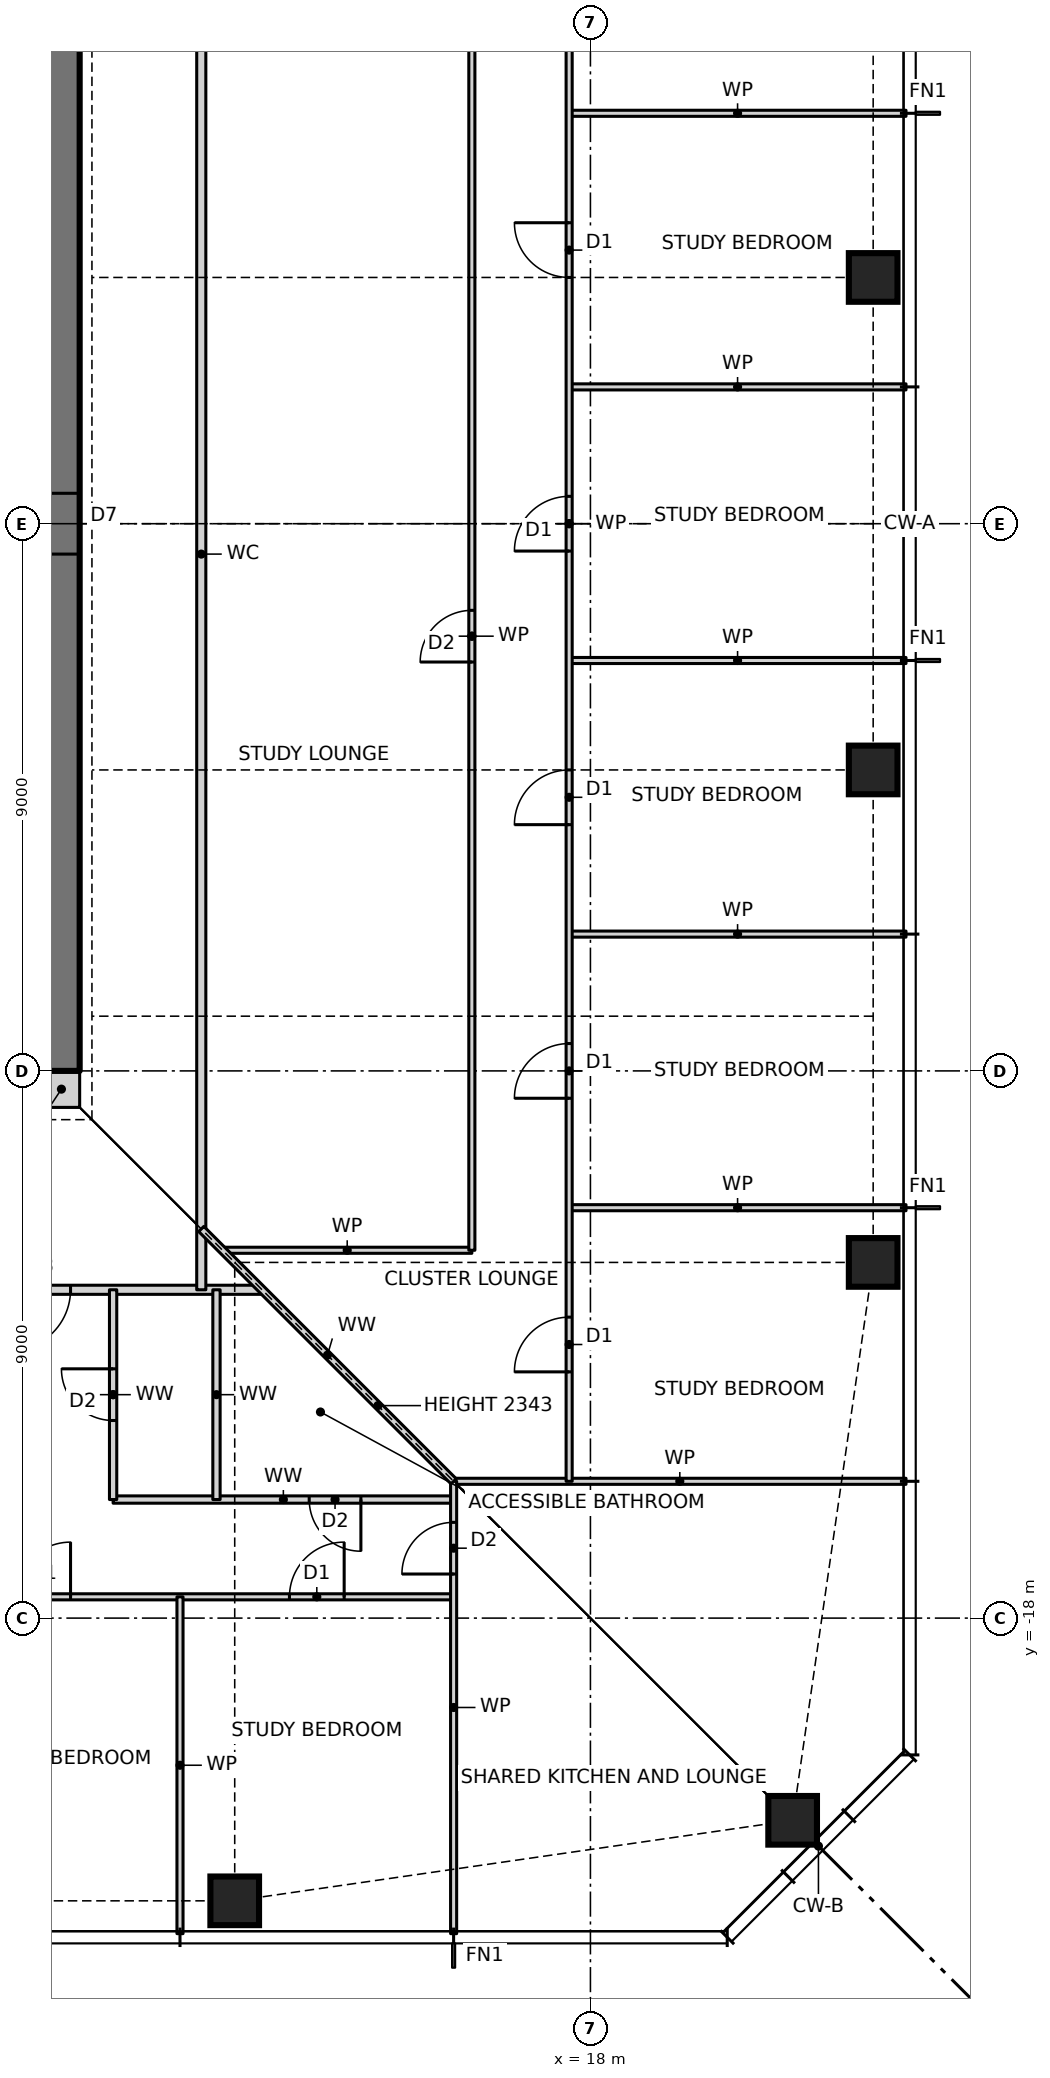
"""IFC4 building model, lengths in metres.
Left out: names, types, materials, properties, quantities, classifications, styles, units other than length and angle.
Written with IfcOpenShell. Run it as: python <this file> out.ifc"""

import sys

from ifc_helpers import new_model, si_unit, direction, frame, frame_2d, origin, origin_2d, place, context, subcontext, project, spatial, rectangle, hollow_rectangle, extrude, element, fill, save


model = new_model("IFC4")
c1 = context("Model", 3, precision=1e-05, world=origin(), true_north=direction((0.0, 1.0)))
c2 = subcontext(c1, "Body", "Model", "MODEL_VIEW")
j1 = project(units=[si_unit("LENGTHUNIT", "METRE"), si_unit("PLANEANGLEUNIT", "RADIAN")], contexts=[c1])
p1 = place(None, origin())
s1 = spatial("IfcSite", under=j1, at=p1, CompositionType="ELEMENT")
p2 = place(p1, origin())
s2 = spatial("IfcBuilding", under=s1, at=p2, CompositionType="ELEMENT")
p3 = place(p2, frame((0.0, 0.0, 15.0)))
s3 = spatial("IfcBuildingStorey", under=s2, at=p3, CompositionType="ELEMENT", Elevation=15.0)
for number, where, z_axis, x_axis in (
    (1, (12.15, -22.65, 0.0), (0.0, 0.0, 1.0), (1.0, 0.0, 0.0)),
    (2, (21.326, -21.326, 0.0), (0.0, 0.0, 1.0), (1.0, 0.0, 0.0)),
    (3, (22.65, -12.15, 0.0), (0.0, 0.0, 1.0), (1.0, 0.0, 0.0)),
    (4, (22.65, -4.05, 0.0), (0.0, 0.0, 1.0), (1.0, 0.0, 0.0)),
    (5, (22.65, 4.05, 0.0), (0.0, 0.0, 1.0), (1.0, 0.0, 0.0)),
):
    element("IfcColumn", number, at=place(p3, frame(where, z_axis=z_axis, x_axis=x_axis)), inside=s3, PredefinedType="COLUMN", context=c2, shape_type="SweptSolid", body=[
        extrude(hollow_rectangle(XDim=0.8, YDim=0.8, WallThickness=0.09, at=origin_2d()), origin(), (0.0, 0.0, 1.0), 3.5),
    ])
p4 = place(p3, frame((9.0, -9.3, 0.0), z_axis=(0.0, 0.0, 1.0), x_axis=(1.0, 0.0, 0.0)))
e6 = element("IfcWall", 6, at=p4, inside=s3, PredefinedType="SOLIDWALL", context=c2, shape_type="SweptSolid", body=[
    extrude(rectangle(XDim=0.6, YDim=0.6, at=frame_2d((0.3, 0.0))), origin(), (0.0, 0.0, 1.0), 3.5),
])
p5 = place(p3, frame((9.0, -9.0, 0.0), z_axis=(0.0, 0.0, 1.0), x_axis=(0.0, 1.0, 0.0)))
e7 = element("IfcWall", 7, at=p5, inside=s3, PredefinedType="SHEAR", context=c2, shape_type="SweptSolid", body=[
    extrude(rectangle(XDim=18.0, YDim=1.2, at=frame_2d((9.0, 0.0))), origin(), (0.0, 0.0, 1.0), 3.5),
])
p6 = place(p5, frame((8.5, 0.0, 0.0)))
e8 = element("IfcOpeningElement", 8, at=p6, cuts=e7, PredefinedType="OPENING", context=c2, shape_type="SweptSolid", body=[
    extrude(rectangle(XDim=1.0, YDim=2.1, at=frame_2d((0.5, 1.05))), frame((0.0, 0.61, 0.0), z_axis=(0.0, -1.0, 0.0), x_axis=(1.0, 0.0, 0.0)), (0.0, 0.0, 1.0), 1.22),
])
p7 = place(p3, frame((-15.75, -17.65, 0.0), z_axis=(0.0, 0.0, 1.0), x_axis=(1.0, 0.0, 0.0)))
e9 = element("IfcWall", 9, at=p7, inside=s3, PredefinedType="PARTITIONING", context=c2, shape_type="SweptSolid", body=[
    extrude(rectangle(XDim=31.5, YDim=0.1, at=frame_2d((15.75, 0.0))), origin(), (0.0, 0.0, 1.0), 3.27),
])
p8 = place(p7, frame((1.8, 0.0, 0.0)))
e10 = element("IfcOpeningElement", 10, at=p8, cuts=e9, PredefinedType="OPENING", context=c2, shape_type="SweptSolid", body=[
    extrude(rectangle(XDim=0.9, YDim=2.1, at=frame_2d((0.45, 1.05))), frame((0.0, 0.06, 0.0), z_axis=(0.0, -1.0, 0.0), x_axis=(1.0, 0.0, 0.0)), (0.0, 0.0, 1.0), 0.12),
])
p9 = place(p7, frame((6.3, 0.0, 0.0)))
e11 = element("IfcOpeningElement", 11, at=p9, cuts=e9, PredefinedType="OPENING", context=c2, shape_type="SweptSolid", body=[
    extrude(rectangle(XDim=0.9, YDim=2.1, at=frame_2d((0.45, 1.05))), frame((0.0, 0.06, 0.0), z_axis=(0.0, -1.0, 0.0), x_axis=(1.0, 0.0, 0.0)), (0.0, 0.0, 1.0), 0.12),
])
p10 = place(p7, frame((10.8, 0.0, 0.0)))
e12 = element("IfcOpeningElement", 12, at=p10, cuts=e9, PredefinedType="OPENING", context=c2, shape_type="SweptSolid", body=[
    extrude(rectangle(XDim=0.9, YDim=2.1, at=frame_2d((0.45, 1.05))), frame((0.0, 0.06, 0.0), z_axis=(0.0, -1.0, 0.0), x_axis=(1.0, 0.0, 0.0)), (0.0, 0.0, 1.0), 0.12),
])
p11 = place(p7, frame((15.3, 0.0, 0.0)))
e13 = element("IfcOpeningElement", 13, at=p11, cuts=e9, PredefinedType="OPENING", context=c2, shape_type="SweptSolid", body=[
    extrude(rectangle(XDim=0.9, YDim=2.1, at=frame_2d((0.45, 1.05))), frame((0.0, 0.06, 0.0), z_axis=(0.0, -1.0, 0.0), x_axis=(1.0, 0.0, 0.0)), (0.0, 0.0, 1.0), 0.12),
])
p12 = place(p7, frame((19.8, 0.0, 0.0)))
e14 = element("IfcOpeningElement", 14, at=p12, cuts=e9, PredefinedType="OPENING", context=c2, shape_type="SweptSolid", body=[
    extrude(rectangle(XDim=0.9, YDim=2.1, at=frame_2d((0.45, 1.05))), frame((0.0, 0.06, 0.0), z_axis=(0.0, -1.0, 0.0), x_axis=(1.0, 0.0, 0.0)), (0.0, 0.0, 1.0), 0.12),
])
p13 = place(p7, frame((24.3, 0.0, 0.0)))
e15 = element("IfcOpeningElement", 15, at=p13, cuts=e9, PredefinedType="OPENING", context=c2, shape_type="SweptSolid", body=[
    extrude(rectangle(XDim=0.9, YDim=2.1, at=frame_2d((0.45, 1.05))), frame((0.0, 0.06, 0.0), z_axis=(0.0, -1.0, 0.0), x_axis=(1.0, 0.0, 0.0)), (0.0, 0.0, 1.0), 0.12),
])
p14 = place(p7, frame((28.8, 0.0, 0.0)))
e16 = element("IfcOpeningElement", 16, at=p14, cuts=e9, PredefinedType="OPENING", context=c2, shape_type="SweptSolid", body=[
    extrude(rectangle(XDim=0.9, YDim=2.1, at=frame_2d((0.45, 1.05))), frame((0.0, 0.06, 0.0), z_axis=(0.0, -1.0, 0.0), x_axis=(1.0, 0.0, 0.0)), (0.0, 0.0, 1.0), 0.12),
])
p15 = place(p3, frame((10.15, -16.05, 0.0), z_axis=(0.0, 0.0, 1.0), x_axis=(1.0, 0.0, 0.0)))
e17 = element("IfcWall", 17, at=p15, inside=s3, PredefinedType="PARTITIONING", context=c2, shape_type="SweptSolid", body=[
    extrude(rectangle(XDim=5.6, YDim=0.12, at=frame_2d((2.8, 0.0))), origin(), (0.0, 0.0, 1.0), 3.27),
])
p16 = place(p15, frame((3.225, 0.0, 0.0)))
e18 = element("IfcOpeningElement", 18, at=p16, cuts=e17, PredefinedType="OPENING", context=c2, shape_type="SweptSolid", body=[
    extrude(rectangle(XDim=0.85, YDim=2.1, at=frame_2d((0.425, 1.05))), frame((0.0, 0.07, 0.0), z_axis=(0.0, -1.0, 0.0), x_axis=(1.0, 0.0, 0.0)), (0.0, 0.0, 1.0), 0.14),
])
p17 = place(p3, frame((15.75, -15.75, 0.0), z_axis=(0.0, 0.0, 1.0), x_axis=(1.0, 0.0, 0.0)))
e19 = element("IfcWall", 19, at=p17, inside=s3, PredefinedType="PARTITIONING", context=c2, shape_type="SweptSolid", body=[
    extrude(rectangle(XDim=7.44, YDim=0.1, at=frame_2d((3.72, 0.0))), origin(), (0.0, 0.0, 1.0), 3.27),
])
p18 = place(p3, frame((-12.6, -12.6, 0.0), z_axis=(0.0, 0.0, 1.0), x_axis=(1.0, 0.0, 0.0)))
e20 = element("IfcWall", 20, at=p18, inside=s3, PredefinedType="PARTITIONING", context=c2, shape_type="SweptSolid", body=[
    extrude(rectangle(XDim=25.2, YDim=0.15, at=frame_2d((12.6, 0.0))), origin(), (0.0, 0.0, 1.0), 3.27),
])
p19 = place(p18, frame((21.05, 0.0, 0.0)))
e21 = element("IfcOpeningElement", 21, at=p19, cuts=e20, PredefinedType="OPENING", context=c2, shape_type="SweptSolid", body=[
    extrude(rectangle(XDim=1.0, YDim=2.1, at=frame_2d((0.5, 1.05))), frame((0.0, 0.085, 0.0), z_axis=(0.0, -1.0, 0.0), x_axis=(1.0, 0.0, 0.0)), (0.0, 0.0, 1.0), 0.17),
])
p20 = place(p3, frame((11.95, -11.95, 0.0), z_axis=(0.0, 0.0, 1.0), x_axis=(1.0, 0.0, 0.0)))
e22 = element("IfcWall", 22, at=p20, inside=s3, PredefinedType="PARTITIONING", context=c2, shape_type="SweptSolid", body=[
    extrude(rectangle(XDim=4.1, YDim=0.1, at=frame_2d((2.05, 0.0))), origin(), (0.0, 0.0, 1.0), 3.27),
])
for number, where, z_axis, x_axis in (
    (23, (17.65, -11.25, 0.0), (0.0, 0.0, 1.0), (1.0, 0.0, 0.0)),
    (24, (17.65, -6.75, 0.0), (0.0, 0.0, 1.0), (1.0, 0.0, 0.0)),
    (25, (17.65, -2.25, 0.0), (0.0, 0.0, 1.0), (1.0, 0.0, 0.0)),
    (26, (17.65, 2.25, 0.0), (0.0, 0.0, 1.0), (1.0, 0.0, 0.0)),
    (27, (17.65, 6.75, 0.0), (0.0, 0.0, 1.0), (1.0, 0.0, 0.0)),
):
    element("IfcWall", number, at=place(p3, frame(where, z_axis=z_axis, x_axis=x_axis)), inside=s3, PredefinedType="PARTITIONING", context=c2, shape_type="SweptSolid", body=[
        extrude(rectangle(XDim=5.54, YDim=0.1, at=frame_2d((2.77, 0.0))), origin(), (0.0, 0.0, 1.0), 3.27),
    ])
p21 = place(p3, frame((17.65, -15.75, 0.0), z_axis=(0.0, 0.0, 1.0), x_axis=(0.0, 1.0, 0.0)))
e28 = element("IfcWall", 28, at=p21, inside=s3, PredefinedType="PARTITIONING", context=c2, shape_type="SweptSolid", body=[
    extrude(rectangle(XDim=31.5, YDim=0.1, at=frame_2d((15.75, 0.0))), origin(), (0.0, 0.0, 1.0), 3.27),
])
p22 = place(p21, frame((1.8, 0.0, 0.0)))
e29 = element("IfcOpeningElement", 29, at=p22, cuts=e28, PredefinedType="OPENING", context=c2, shape_type="SweptSolid", body=[
    extrude(rectangle(XDim=0.9, YDim=2.1, at=frame_2d((0.45, 1.05))), frame((0.0, 0.06, 0.0), z_axis=(0.0, -1.0, 0.0), x_axis=(1.0, 0.0, 0.0)), (0.0, 0.0, 1.0), 0.12),
])
p23 = place(p21, frame((6.3, 0.0, 0.0)))
e30 = element("IfcOpeningElement", 30, at=p23, cuts=e28, PredefinedType="OPENING", context=c2, shape_type="SweptSolid", body=[
    extrude(rectangle(XDim=0.9, YDim=2.1, at=frame_2d((0.45, 1.05))), frame((0.0, 0.06, 0.0), z_axis=(0.0, -1.0, 0.0), x_axis=(1.0, 0.0, 0.0)), (0.0, 0.0, 1.0), 0.12),
])
p24 = place(p21, frame((10.8, 0.0, 0.0)))
e31 = element("IfcOpeningElement", 31, at=p24, cuts=e28, PredefinedType="OPENING", context=c2, shape_type="SweptSolid", body=[
    extrude(rectangle(XDim=0.9, YDim=2.1, at=frame_2d((0.45, 1.05))), frame((0.0, 0.06, 0.0), z_axis=(0.0, -1.0, 0.0), x_axis=(1.0, 0.0, 0.0)), (0.0, 0.0, 1.0), 0.12),
])
p25 = place(p21, frame((15.3, 0.0, 0.0)))
e32 = element("IfcOpeningElement", 32, at=p25, cuts=e28, PredefinedType="OPENING", context=c2, shape_type="SweptSolid", body=[
    extrude(rectangle(XDim=0.9, YDim=2.1, at=frame_2d((0.45, 1.05))), frame((0.0, 0.06, 0.0), z_axis=(0.0, -1.0, 0.0), x_axis=(1.0, 0.0, 0.0)), (0.0, 0.0, 1.0), 0.12),
])
p26 = place(p21, frame((19.8, 0.0, 0.0)))
e33 = element("IfcOpeningElement", 33, at=p26, cuts=e28, PredefinedType="OPENING", context=c2, shape_type="SweptSolid", body=[
    extrude(rectangle(XDim=0.9, YDim=2.1, at=frame_2d((0.45, 1.05))), frame((0.0, 0.06, 0.0), z_axis=(0.0, -1.0, 0.0), x_axis=(1.0, 0.0, 0.0)), (0.0, 0.0, 1.0), 0.12),
])
p27 = place(p21, frame((24.3, 0.0, 0.0)))
e34 = element("IfcOpeningElement", 34, at=p27, cuts=e28, PredefinedType="OPENING", context=c2, shape_type="SweptSolid", body=[
    extrude(rectangle(XDim=0.9, YDim=2.1, at=frame_2d((0.45, 1.05))), frame((0.0, 0.06, 0.0), z_axis=(0.0, -1.0, 0.0), x_axis=(1.0, 0.0, 0.0)), (0.0, 0.0, 1.0), 0.12),
])
p28 = place(p21, frame((28.8, 0.0, 0.0)))
e35 = element("IfcOpeningElement", 35, at=p28, cuts=e28, PredefinedType="OPENING", context=c2, shape_type="SweptSolid", body=[
    extrude(rectangle(XDim=0.9, YDim=2.1, at=frame_2d((0.45, 1.05))), frame((0.0, 0.06, 0.0), z_axis=(0.0, -1.0, 0.0), x_axis=(1.0, 0.0, 0.0)), (0.0, 0.0, 1.0), 0.12),
])
p29 = place(p3, frame((16.05, -11.95, 0.0), z_axis=(0.0, 0.0, 1.0), x_axis=(0.0, 1.0, 0.0)))
e36 = element("IfcWall", 36, at=p29, inside=s3, PredefinedType="PARTITIONING", context=c2, shape_type="SweptSolid", body=[
    extrude(rectangle(XDim=20.2, YDim=0.1, at=frame_2d((10.1, 0.0))), origin(), (0.0, 0.0, 1.0), 3.27),
])
p30 = place(p29, frame((9.675, 0.0, 0.0)))
e37 = element("IfcOpeningElement", 37, at=p30, cuts=e36, PredefinedType="OPENING", context=c2, shape_type="SweptSolid", body=[
    extrude(rectangle(XDim=0.85, YDim=2.1, at=frame_2d((0.425, 1.05))), frame((0.0, 0.06, 0.0), z_axis=(0.0, -1.0, 0.0), x_axis=(1.0, 0.0, 0.0)), (0.0, 0.0, 1.0), 0.12),
])
p31 = place(p3, frame((15.75, -23.19, 0.0), z_axis=(0.0, 0.0, 1.0), x_axis=(0.0, 1.0, 0.0)))
e38 = element("IfcWall", 38, at=p31, inside=s3, PredefinedType="PARTITIONING", context=c2, shape_type="SweptSolid", body=[
    extrude(rectangle(XDim=7.44, YDim=0.1, at=frame_2d((3.72, 0.0))), origin(), (0.0, 0.0, 1.0), 3.27),
])
p32 = place(p31, frame((5.915, 0.0, 0.0)))
e39 = element("IfcOpeningElement", 39, at=p32, cuts=e38, PredefinedType="OPENING", context=c2, shape_type="SweptSolid", body=[
    extrude(rectangle(XDim=0.85, YDim=2.1, at=frame_2d((0.425, 1.05))), frame((0.0, 0.06, 0.0), z_axis=(0.0, -1.0, 0.0), x_axis=(1.0, 0.0, 0.0)), (0.0, 0.0, 1.0), 0.12),
])
p33 = place(p3, frame((11.85, -16.05, 0.0), z_axis=(0.0, 0.0, 1.0), x_axis=(0.0, 1.0, 0.0)))
e40 = element("IfcWall", 40, at=p33, inside=s3, PredefinedType="PARTITIONING", context=c2, shape_type="SweptSolid", body=[
    extrude(rectangle(XDim=3.45, YDim=0.12, at=frame_2d((1.725, 0.0))), origin(), (0.0, 0.0, 1.0), 3.27),
])
p34 = place(p3, frame((11.6, -12.6, 0.0), z_axis=(0.0, 0.0, 1.0), x_axis=(0.0, 1.0, 0.0)))
e41 = element("IfcWall", 41, at=p34, inside=s3, PredefinedType="PARTITIONING", context=c2, shape_type="SweptSolid", body=[
    extrude(rectangle(XDim=24.2, YDim=0.15, at=frame_2d((12.1, 0.0))), origin(), (0.0, 0.0, 1.0), 3.27),
])
p35 = place(p34, frame((21.55, 0.0, 0.0)))
e42 = element("IfcOpeningElement", 42, at=p35, cuts=e41, PredefinedType="OPENING", context=c2, shape_type="SweptSolid", body=[
    extrude(rectangle(XDim=1.0, YDim=2.1, at=frame_2d((0.5, 1.05))), frame((0.0, 0.085, 0.0), z_axis=(0.0, -1.0, 0.0), x_axis=(1.0, 0.0, 0.0)), (0.0, 0.0, 1.0), 0.17),
])
p36 = place(p3, frame((11.25, -23.19, 0.0), z_axis=(0.0, 0.0, 1.0), x_axis=(0.0, 1.0, 0.0)))
e43 = element("IfcWall", 43, at=p36, inside=s3, PredefinedType="PARTITIONING", context=c2, shape_type="SweptSolid", body=[
    extrude(rectangle(XDim=5.54, YDim=0.1, at=frame_2d((2.77, 0.0))), origin(), (0.0, 0.0, 1.0), 3.27),
])
p37 = place(p3, frame((10.15, -16.05, 0.0), z_axis=(0.0, 0.0, 1.0), x_axis=(0.0, 1.0, 0.0)))
e44 = element("IfcWall", 44, at=p37, inside=s3, PredefinedType="PARTITIONING", context=c2, shape_type="SweptSolid", body=[
    extrude(rectangle(XDim=3.45, YDim=0.12, at=frame_2d((1.725, 0.0))), origin(), (0.0, 0.0, 1.0), 3.27),
])
p38 = place(p37, frame((1.3, 0.0, 0.0)))
e45 = element("IfcOpeningElement", 45, at=p38, cuts=e44, PredefinedType="OPENING", context=c2, shape_type="SweptSolid", body=[
    extrude(rectangle(XDim=0.85, YDim=2.1, at=frame_2d((0.425, 1.05))), frame((0.0, 0.07, 0.0), z_axis=(0.0, -1.0, 0.0), x_axis=(1.0, 0.0, 0.0)), (0.0, 0.0, 1.0), 0.14),
])
p39 = place(p3, frame((15.75, -15.75, 0.0), z_axis=(0.0, 0.0, 1.0), x_axis=(-0.707106781187, 0.707106781187, 0.0)))
e46 = element("IfcWall", 46, at=p39, inside=s3, PredefinedType="PARTITIONING", context=c2, shape_type="SweptSolid", body=[
    extrude(rectangle(XDim=5.869, YDim=0.12, at=frame_2d((2.935, 0.0))), origin(), (0.0, 0.0, 1.0), 2.343),
])
p40 = place(p13, origin())
e47 = element("IfcDoor", 47, at=p40, inside=s3, OperationType="SINGLE_SWING_RIGHT", PredefinedType="DOOR", context=c2, shape_type="SweptSolid", body=[
    extrude(rectangle(XDim=0.9, YDim=2.1, at=frame_2d((0.45, 1.05))), frame((0.0, 0.025, 0.0), z_axis=(0.0, -1.0, 0.0), x_axis=(1.0, 0.0, 0.0)), (0.0, 0.0, 1.0), 0.05),
])
fill(e15, e47)
p41 = place(p14, origin())
e48 = element("IfcDoor", 48, at=p41, inside=s3, OperationType="SINGLE_SWING_RIGHT", PredefinedType="DOOR", context=c2, shape_type="SweptSolid", body=[
    extrude(rectangle(XDim=0.9, YDim=2.1, at=frame_2d((0.45, 1.05))), frame((0.0, 0.025, 0.0), z_axis=(0.0, -1.0, 0.0), x_axis=(1.0, 0.0, 0.0)), (0.0, 0.0, 1.0), 0.05),
])
fill(e16, e48)
p42 = place(p19, frame((1.0, 0.0, 0.0), z_axis=(0.0, 0.0, 1.0), x_axis=(-1.0, 0.0, 0.0)))
e49 = element("IfcDoor", 49, at=p42, inside=s3, OperationType="SINGLE_SWING_RIGHT", PredefinedType="DOOR", context=c2, shape_type="SweptSolid", body=[
    extrude(rectangle(XDim=1.0, YDim=2.1, at=frame_2d((0.5, 1.05))), frame((0.0, 0.025, 0.0), z_axis=(0.0, -1.0, 0.0), x_axis=(1.0, 0.0, 0.0)), (0.0, 0.0, 1.0), 0.05),
])
fill(e21, e49)
p43 = place(p38, origin())
e50 = element("IfcDoor", 50, at=p43, inside=s3, OperationType="SINGLE_SWING_RIGHT", PredefinedType="DOOR", context=c2, shape_type="SweptSolid", body=[
    extrude(rectangle(XDim=0.85, YDim=2.1, at=frame_2d((0.425, 1.05))), frame((0.0, 0.025, 0.0), z_axis=(0.0, -1.0, 0.0), x_axis=(1.0, 0.0, 0.0)), (0.0, 0.0, 1.0), 0.05),
])
fill(e45, e50)
p44 = place(p16, frame((0.85, 0.0, 0.0), z_axis=(0.0, 0.0, 1.0), x_axis=(-1.0, 0.0, 0.0)))
e51 = element("IfcDoor", 51, at=p44, inside=s3, OperationType="SINGLE_SWING_LEFT", PredefinedType="DOOR", context=c2, shape_type="SweptSolid", body=[
    extrude(rectangle(XDim=0.85, YDim=2.1, at=frame_2d((0.425, 1.05))), frame((0.0, 0.025, 0.0), z_axis=(0.0, -1.0, 0.0), x_axis=(1.0, 0.0, 0.0)), (0.0, 0.0, 1.0), 0.05),
])
fill(e18, e51)
p45 = place(p22, origin())
e52 = element("IfcDoor", 52, at=p45, inside=s3, OperationType="SINGLE_SWING_LEFT", PredefinedType="DOOR", context=c2, shape_type="SweptSolid", body=[
    extrude(rectangle(XDim=0.9, YDim=2.1, at=frame_2d((0.45, 1.05))), frame((0.0, 0.025, 0.0), z_axis=(0.0, -1.0, 0.0), x_axis=(1.0, 0.0, 0.0)), (0.0, 0.0, 1.0), 0.05),
])
fill(e29, e52)
p46 = place(p23, origin())
e53 = element("IfcDoor", 53, at=p46, inside=s3, OperationType="SINGLE_SWING_LEFT", PredefinedType="DOOR", context=c2, shape_type="SweptSolid", body=[
    extrude(rectangle(XDim=0.9, YDim=2.1, at=frame_2d((0.45, 1.05))), frame((0.0, 0.025, 0.0), z_axis=(0.0, -1.0, 0.0), x_axis=(1.0, 0.0, 0.0)), (0.0, 0.0, 1.0), 0.05),
])
fill(e30, e53)
p47 = place(p24, origin())
e54 = element("IfcDoor", 54, at=p47, inside=s3, OperationType="SINGLE_SWING_LEFT", PredefinedType="DOOR", context=c2, shape_type="SweptSolid", body=[
    extrude(rectangle(XDim=0.9, YDim=2.1, at=frame_2d((0.45, 1.05))), frame((0.0, 0.025, 0.0), z_axis=(0.0, -1.0, 0.0), x_axis=(1.0, 0.0, 0.0)), (0.0, 0.0, 1.0), 0.05),
])
fill(e31, e54)
p48 = place(p25, origin())
e55 = element("IfcDoor", 55, at=p48, inside=s3, OperationType="SINGLE_SWING_LEFT", PredefinedType="DOOR", context=c2, shape_type="SweptSolid", body=[
    extrude(rectangle(XDim=0.9, YDim=2.1, at=frame_2d((0.45, 1.05))), frame((0.0, 0.025, 0.0), z_axis=(0.0, -1.0, 0.0), x_axis=(1.0, 0.0, 0.0)), (0.0, 0.0, 1.0), 0.05),
])
fill(e32, e55)
p49 = place(p26, origin())
e56 = element("IfcDoor", 56, at=p49, inside=s3, OperationType="SINGLE_SWING_RIGHT", PredefinedType="DOOR", context=c2, shape_type="SweptSolid", body=[
    extrude(rectangle(XDim=0.9, YDim=2.1, at=frame_2d((0.45, 1.05))), frame((0.0, 0.025, 0.0), z_axis=(0.0, -1.0, 0.0), x_axis=(1.0, 0.0, 0.0)), (0.0, 0.0, 1.0), 0.05),
])
fill(e33, e56)
p50 = place(p30, origin())
e57 = element("IfcDoor", 57, at=p50, inside=s3, OperationType="SINGLE_SWING_LEFT", PredefinedType="DOOR", context=c2, shape_type="SweptSolid", body=[
    extrude(rectangle(XDim=0.85, YDim=2.1, at=frame_2d((0.425, 1.05))), frame((0.0, 0.025, 0.0), z_axis=(0.0, -1.0, 0.0), x_axis=(1.0, 0.0, 0.0)), (0.0, 0.0, 1.0), 0.05),
])
fill(e37, e57)
p51 = place(p32, origin())
e58 = element("IfcDoor", 58, at=p51, inside=s3, OperationType="SINGLE_SWING_LEFT", PredefinedType="DOOR", context=c2, shape_type="SweptSolid", body=[
    extrude(rectangle(XDim=0.85, YDim=2.1, at=frame_2d((0.425, 1.05))), frame((0.0, 0.025, 0.0), z_axis=(0.0, -1.0, 0.0), x_axis=(1.0, 0.0, 0.0)), (0.0, 0.0, 1.0), 0.05),
])
fill(e39, e58)
save(model, sys.argv[1])
